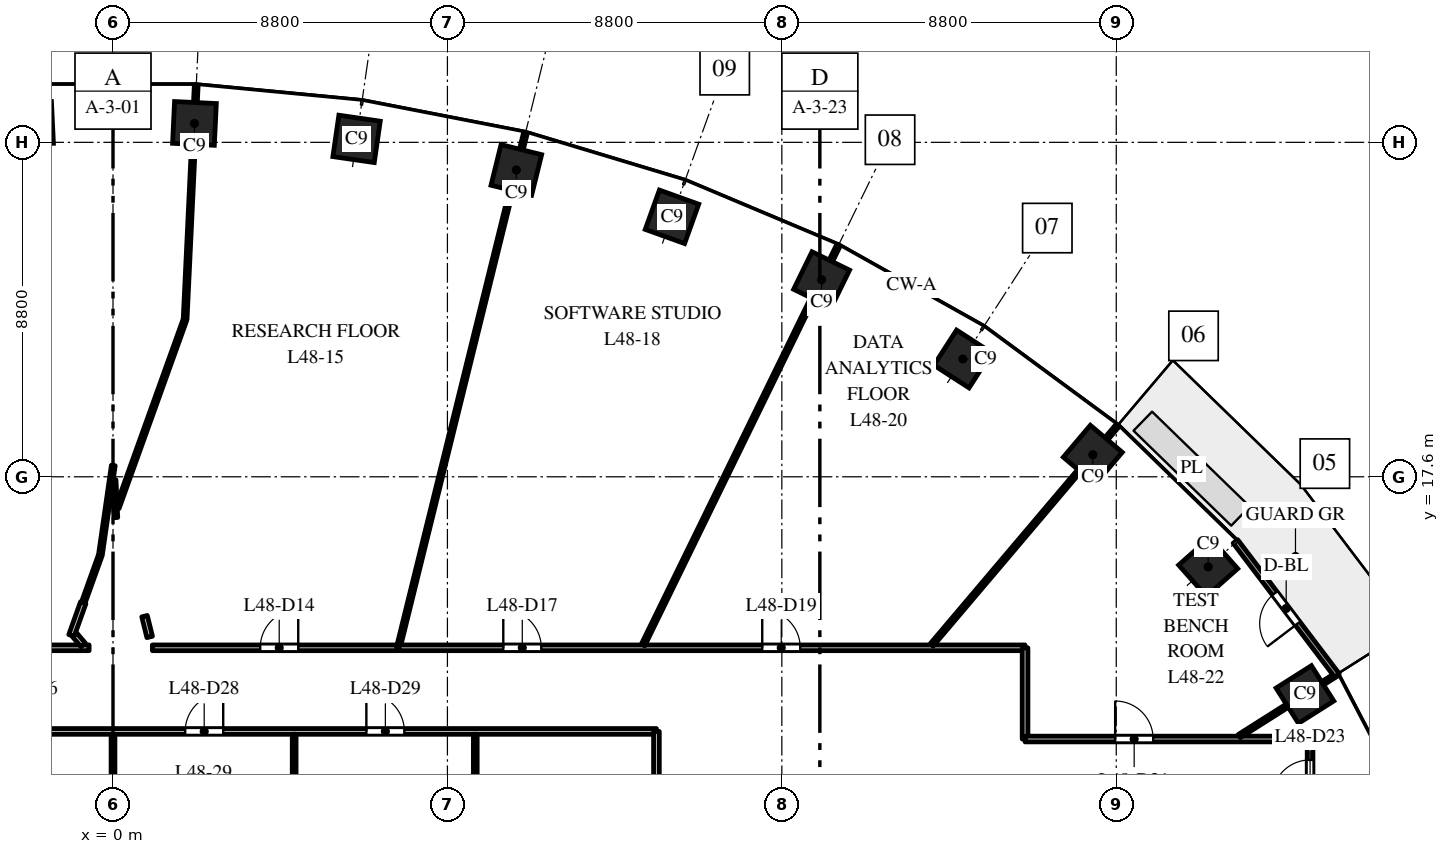
"""IFC4 building model, lengths in metres.
Left out: names, types, materials, properties, quantities, classifications, styles, units other than length and angle.
Written with IfcOpenShell. Run it as: python <this file> out.ifc"""

import sys

from ifc_helpers import new_model, si_unit, direction, frame, frame_2d, origin, origin_2d, place, context, subcontext, project, spatial, rectangle, extrude, element, fill, save


model = new_model("IFC4")
c1 = context("Model", 3, precision=1e-05, world=origin(), true_north=direction((0.0, 1.0)))
c2 = subcontext(c1, "Body", "Model", "MODEL_VIEW")
j1 = project(units=[si_unit("LENGTHUNIT", "METRE"), si_unit("PLANEANGLEUNIT", "RADIAN")], contexts=[c1])
p1 = place(None, origin())
s1 = spatial("IfcSite", under=j1, at=p1, CompositionType="ELEMENT")
p2 = place(p1, origin())
s2 = spatial("IfcBuilding", under=s1, at=p2, CompositionType="ELEMENT")
p3 = place(p2, frame((0.0, 0.0, 233.5)))
s3 = spatial("IfcBuildingStorey", under=s2, at=p3, CompositionType="ELEMENT", Elevation=233.5)
for number, where, z_axis, x_axis in (
    (1, (31.365, 11.871, 0.0), (0.0, 0.0, 1.0), (-0.535, 0.845, 0.0)),
    (2, (28.819, 15.23, 0.0), (0.0, 0.0, 1.0), (-0.663, 0.749, 0.0)),
    (3, (25.783, 18.18, 0.0), (0.0, 0.0, 1.0), (-0.763, 0.646, 0.0)),
    (4, (22.362, 20.7, 0.0), (0.0, 0.0, 1.0), (-0.84, 0.542, 0.0)),
    (5, (18.646, 22.785, 0.0), (0.0, 0.0, 1.0), (-0.898, 0.439, 0.0)),
    (6, (14.709, 24.441, 0.0), (0.0, 0.0, 1.0), (-0.941, 0.338, 0.0)),
    (7, (10.613, 25.674, 0.0), (0.0, 0.0, 1.0), (-0.971, 0.24, 0.0)),
    (8, (6.409, 26.491, 0.0), (0.0, 0.0, 1.0), (-0.99, 0.143, 0.0)),
    (9, (2.143, 26.898, 0.0), (0.0, 0.0, 1.0), (-0.999, 0.048, 0.0)),
    (10, (-2.143, 26.898, 0.0), (0.0, 0.0, 1.0), (-0.999, -0.048, 0.0)),
):
    element("IfcColumn", number, at=place(p3, frame(where, z_axis=z_axis, x_axis=x_axis)), inside=s3, PredefinedType="COLUMN", context=c2, shape_type="SweptSolid", body=[
        extrude(rectangle(XDim=1.1, YDim=1.1, at=origin_2d()), origin(), (0.0, 0.0, 1.0), 4.0),
    ])
p4 = place(p3, frame((32.208, 12.374, 0.0), z_axis=(0.0, 0.0, 1.0), x_axis=(-0.604045763106, 0.796949632081, 0.0)))
e11 = element("IfcWall", 11, at=p4, inside=s3, PredefinedType="STANDARD", context=c2, shape_type="SweptSolid", body=[
    extrude(rectangle(XDim=4.423, YDim=0.15, at=frame_2d((2.212, 0.0))), origin(), (0.0, 0.0, 1.0), 3.7),
])
p5 = place(p4, frame((1.712, 0.0, 0.0)))
e12 = element("IfcOpeningElement", 12, at=p5, cuts=e11, PredefinedType="OPENING", context=c2, shape_type="SweptSolid", body=[
    extrude(rectangle(XDim=1.0, YDim=2.4, at=frame_2d((0.5, 1.2))), frame((0.0, 0.085, 0.0), z_axis=(0.0, -1.0, 0.0), x_axis=(1.0, 0.0, 0.0)), (0.0, 0.0, 1.0), 0.17),
])
p6 = place(p3, frame((-14.3, 10.9, 0.0), z_axis=(0.0, 0.0, 1.0), x_axis=(1.0, 0.0, 0.0)))
e13 = element("IfcWall", 13, at=p6, inside=s3, PredefinedType="PARTITIONING", context=c2, shape_type="SweptSolid", body=[
    extrude(rectangle(XDim=28.6, YDim=0.15, at=frame_2d((14.3, 0.0))), origin(), (0.0, 0.0, 1.0), 2.85),
])
p7 = place(p6, frame((11.433, 0.0, 0.0)))
e14 = element("IfcOpeningElement", 14, at=p7, cuts=e13, PredefinedType="OPENING", context=c2, shape_type="SweptSolid", body=[
    extrude(rectangle(XDim=1.0, YDim=2.1, at=frame_2d((0.5, 1.05))), frame((0.0, 0.085, 0.0), z_axis=(0.0, -1.0, 0.0), x_axis=(1.0, 0.0, 0.0)), (0.0, 0.0, 1.0), 0.17),
])
p8 = place(p6, frame((16.2, 0.0, 0.0)))
e15 = element("IfcOpeningElement", 15, at=p8, cuts=e13, PredefinedType="OPENING", context=c2, shape_type="SweptSolid", body=[
    extrude(rectangle(XDim=1.0, YDim=2.1, at=frame_2d((0.5, 1.05))), frame((0.0, 0.085, 0.0), z_axis=(0.0, -1.0, 0.0), x_axis=(1.0, 0.0, 0.0)), (0.0, 0.0, 1.0), 0.17),
])
p9 = place(p6, frame((20.967, 0.0, 0.0)))
e16 = element("IfcOpeningElement", 16, at=p9, cuts=e13, PredefinedType="OPENING", context=c2, shape_type="SweptSolid", body=[
    extrude(rectangle(XDim=1.0, YDim=2.1, at=frame_2d((0.5, 1.05))), frame((0.0, 0.085, 0.0), z_axis=(0.0, -1.0, 0.0), x_axis=(1.0, 0.0, 0.0)), (0.0, 0.0, 1.0), 0.17),
])
p10 = place(p3, frame((-7.925, 13.1, 0.0), z_axis=(0.0, 0.0, 1.0), x_axis=(1.0, 0.0, 0.0)))
e17 = element("IfcWall", 17, at=p10, inside=s3, PredefinedType="PARTITIONING", context=c2, shape_type="SweptSolid", body=[
    extrude(rectangle(XDim=7.296, YDim=0.15, at=frame_2d((3.648, 0.0))), origin(), (0.0, 0.0, 1.0), 2.85),
])
p11 = place(p10, frame((3.048, 0.0, 0.0)))
e18 = element("IfcOpeningElement", 18, at=p11, cuts=e17, PredefinedType="OPENING", context=c2, shape_type="SweptSolid", body=[
    extrude(rectangle(XDim=1.0, YDim=2.1, at=frame_2d((0.5, 1.05))), frame((0.0, 0.085, 0.0), z_axis=(0.0, -1.0, 0.0), x_axis=(1.0, 0.0, 0.0)), (0.0, 0.0, 1.0), 0.17),
])
p12 = place(p3, frame((-1.093, 13.423, 0.0), z_axis=(0.0, 0.0, 1.0), x_axis=(0.337586124745, 0.941294644827, 0.0)))
e19 = element("IfcWall", 19, at=p12, inside=s3, PredefinedType="PARTITIONING", context=c2, shape_type="SweptSolid", body=[
    extrude(rectangle(XDim=0.916, YDim=0.15, at=frame_2d((0.458, 0.0))), origin(), (0.0, 0.0, 1.0), 2.85),
])
p13 = place(p3, frame((-1.008, 13.439, 0.0), z_axis=(0.0, 0.0, 1.0), x_axis=(0.645657197235, -0.763627385351, 0.0)))
e20 = element("IfcWall", 20, at=p13, inside=s3, PredefinedType="PARTITIONING", context=c2, shape_type="SweptSolid", body=[
    extrude(rectangle(XDim=0.346, YDim=0.15, at=frame_2d((0.173, 0.0))), origin(), (0.0, 0.0, 1.0), 2.85),
])
p14 = place(p3, frame((-0.781, 14.294, 0.0), z_axis=(0.0, 0.0, 1.0), x_axis=(0.338162451205, 0.941087751804, 0.0)))
e21 = element("IfcWall", 21, at=p14, inside=s3, PredefinedType="PARTITIONING", context=c2, shape_type="SweptSolid", body=[
    extrude(rectangle(XDim=1.304, YDim=0.1, at=frame_2d((0.652, 0.0))), origin(), (0.0, 0.0, 1.0), 3.7),
])
p15 = place(p3, frame((-0.332, 15.539, 0.0), z_axis=(0.0, 0.0, 1.0), x_axis=(0.142697629543, 0.989766329253, 0.0)))
e22 = element("IfcWall", 22, at=p15, inside=s3, PredefinedType="PARTITIONING", context=c2, shape_type="SweptSolid", body=[
    extrude(rectangle(XDim=2.383, YDim=0.1, at=frame_2d((1.192, 0.0))), origin(), (0.0, 0.0, 1.0), 3.7),
])
p16 = place(p3, frame((0.0, 7.504, 0.0), z_axis=(0.0, 0.0, 1.0), x_axis=(0.0, 1.0, 0.0)))
e23 = element("IfcWall", 23, at=p16, inside=s3, PredefinedType="PARTITIONING", context=c2, shape_type="SweptSolid", body=[
    extrude(rectangle(XDim=3.321, YDim=0.1, at=frame_2d((1.661, 0.0))), origin(), (0.0, 0.0, 1.0), 3.7),
])
p17 = place(p3, frame((0.028, 17.518, 0.0), z_axis=(0.0, 0.0, 1.0), x_axis=(0.046267226044, -0.998929098482, 0.0)))
e24 = element("IfcWall", 24, at=p17, inside=s3, PredefinedType="PARTITIONING", context=c2, shape_type="SweptSolid", body=[
    extrude(rectangle(XDim=0.992, YDim=0.1, at=frame_2d((0.496, 0.0))), origin(), (0.0, 0.0, 1.0), 3.7),
])
p18 = place(p3, frame((0.113, 16.781, 0.0), z_axis=(0.0, 0.0, 1.0), x_axis=(0.338409154086, 0.940999067178, 0.0)))
e25 = element("IfcWall", 25, at=p18, inside=s3, PredefinedType="PARTITIONING", context=c2, shape_type="SweptSolid", body=[
    extrude(rectangle(XDim=5.266, YDim=0.1, at=frame_2d((2.633, 0.0))), origin(), (0.0, 0.0, 1.0), 3.7),
])
p19 = place(p3, frame((0.83, 13.933, 0.0), z_axis=(0.0, 0.0, 1.0), x_axis=(0.239578315167, -0.970877042113, 0.0)))
e26 = element("IfcWall", 26, at=p19, inside=s3, PredefinedType="PARTITIONING", context=c2, shape_type="SweptSolid", body=[
    extrude(rectangle(XDim=0.563, YDim=0.15, at=frame_2d((0.282, 0.0))), origin(), (0.0, 0.0, 1.0), 3.7),
])
p20 = place(p3, frame((1.036, 13.1, 0.0), z_axis=(0.0, 0.0, 1.0), x_axis=(1.0, 0.0, 0.0)))
e27 = element("IfcWall", 27, at=p20, inside=s3, PredefinedType="PARTITIONING", context=c2, shape_type="SweptSolid", body=[
    extrude(rectangle(XDim=6.471, YDim=0.15, at=frame_2d((3.236, 0.0))), origin(), (0.0, 0.0, 1.0), 2.85),
])
p21 = place(p20, frame((2.838, 0.0, 0.0)))
e28 = element("IfcOpeningElement", 28, at=p21, cuts=e27, PredefinedType="OPENING", context=c2, shape_type="SweptSolid", body=[
    extrude(rectangle(XDim=1.0, YDim=2.1, at=frame_2d((0.5, 1.05))), frame((0.0, 0.085, 0.0), z_axis=(0.0, -1.0, 0.0), x_axis=(1.0, 0.0, 0.0)), (0.0, 0.0, 1.0), 0.17),
])
p22 = place(p3, frame((1.898, 21.75, 0.0), z_axis=(0.0, 0.0, 1.0), x_axis=(0.047440765919, 0.998874052986, 0.0)))
e29 = element("IfcWall", 29, at=p22, inside=s3, PredefinedType="PARTITIONING", context=c2, shape_type="SweptSolid", body=[
    extrude(rectangle(XDim=6.155, YDim=0.1, at=frame_2d((3.077, 0.0))), origin(), (0.0, 0.0, 1.0), 3.0),
])
p23 = place(p3, frame((4.767, 6.363, 0.0), z_axis=(0.0, 0.0, 1.0), x_axis=(0.0, 1.0, 0.0)))
e30 = element("IfcWall", 30, at=p23, inside=s3, PredefinedType="PARTITIONING", context=c2, shape_type="SweptSolid", body=[
    extrude(rectangle(XDim=4.462, YDim=0.1, at=frame_2d((2.231, 0.0))), origin(), (0.0, 0.0, 1.0), 2.85),
])
p24 = place(p3, frame((7.507, 13.1, 0.0), z_axis=(0.0, 0.0, 1.0), x_axis=(0.239800961037, 0.970822073856, 0.0)))
e31 = element("IfcWall", 31, at=p24, inside=s3, PredefinedType="PARTITIONING", context=c2, shape_type="SweptSolid", body=[
    extrude(rectangle(XDim=13.953, YDim=0.1, at=frame_2d((6.977, 0.0))), origin(), (0.0, 0.0, 1.0), 3.0),
])
p25 = place(p3, frame((7.524, 13.1, 0.0), z_axis=(0.0, 0.0, 1.0), x_axis=(1.0, 0.0, 0.0)))
e32 = element("IfcWall", 32, at=p25, inside=s3, PredefinedType="PARTITIONING", context=c2, shape_type="SweptSolid", body=[
    extrude(rectangle(XDim=16.476, YDim=0.15, at=frame_2d((8.238, 0.0))), origin(), (0.0, 0.0, 1.0), 2.85),
])
p26 = place(p25, frame((2.746, 0.0, 0.0)))
e33 = element("IfcOpeningElement", 33, at=p26, cuts=e32, PredefinedType="OPENING", context=c2, shape_type="SweptSolid", body=[
    extrude(rectangle(XDim=1.0, YDim=2.1, at=frame_2d((0.5, 1.05))), frame((0.0, 0.085, 0.0), z_axis=(0.0, -1.0, 0.0), x_axis=(1.0, 0.0, 0.0)), (0.0, 0.0, 1.0), 0.17),
])
p27 = place(p25, frame((9.56, 0.0, 0.0)))
e34 = element("IfcOpeningElement", 34, at=p27, cuts=e32, PredefinedType="OPENING", context=c2, shape_type="SweptSolid", body=[
    extrude(rectangle(XDim=1.0, YDim=2.1, at=frame_2d((0.5, 1.05))), frame((0.0, 0.085, 0.0), z_axis=(0.0, -1.0, 0.0), x_axis=(1.0, 0.0, 0.0)), (0.0, 0.0, 1.0), 0.17),
])
p28 = place(p3, frame((9.533, -10.825, 0.0), z_axis=(0.0, 0.0, 1.0), x_axis=(0.0, 1.0, 0.0)))
e35 = element("IfcWall", 35, at=p28, inside=s3, PredefinedType="PARTITIONING", context=c2, shape_type="SweptSolid", body=[
    extrude(rectangle(XDim=21.65, YDim=0.1, at=frame_2d((10.825, 0.0))), origin(), (0.0, 0.0, 1.0), 2.75),
])
p29 = place(p3, frame((13.948, 13.175, 0.0), z_axis=(0.0, 0.0, 1.0), x_axis=(0.439190294188, 0.898394059136, 0.0)))
e36 = element("IfcWall", 36, at=p29, inside=s3, PredefinedType="PARTITIONING", context=c2, shape_type="SweptSolid", body=[
    extrude(rectangle(XDim=11.699, YDim=0.1, at=frame_2d((5.849, 0.0))), origin(), (0.0, 0.0, 1.0), 3.0),
])
p30 = place(p3, frame((14.3, -10.9, 0.0), z_axis=(0.0, 0.0, 1.0), x_axis=(0.0, 1.0, 0.0)))
e37 = element("IfcWall", 37, at=p30, inside=s3, PredefinedType="PARTITIONING", context=c2, shape_type="SweptSolid", body=[
    extrude(rectangle(XDim=21.8, YDim=0.15, at=frame_2d((10.9, 0.0))), origin(), (0.0, 0.0, 1.0), 2.75),
])
p31 = place(p30, frame((10.4, 0.0, 0.0)))
e38 = element("IfcOpeningElement", 38, at=p31, cuts=e37, PredefinedType="OPENING", context=c2, shape_type="SweptSolid", body=[
    extrude(rectangle(XDim=1.0, YDim=2.1, at=frame_2d((0.5, 1.05))), frame((0.0, 0.085, 0.0), z_axis=(0.0, -1.0, 0.0), x_axis=(1.0, 0.0, 0.0)), (0.0, 0.0, 1.0), 0.17),
])
p32 = place(p3, frame((21.542, 13.175, 0.0), z_axis=(0.0, 0.0, 1.0), x_axis=(0.646374865928, 0.763020008058, 0.0)))
e39 = element("IfcWall", 39, at=p32, inside=s3, PredefinedType="PARTITIONING", context=c2, shape_type="SweptSolid", body=[
    extrude(rectangle(XDim=7.562, YDim=0.1, at=frame_2d((3.781, 0.0))), origin(), (0.0, 0.0, 1.0), 3.0),
])
p33 = place(p3, frame((24.0, 10.7, 0.0), z_axis=(0.0, 0.0, 1.0), x_axis=(0.0, 1.0, 0.0)))
e40 = element("IfcWall", 40, at=p33, inside=s3, PredefinedType="PARTITIONING", context=c2, shape_type="SweptSolid", body=[
    extrude(rectangle(XDim=2.4, YDim=0.15, at=frame_2d((1.2, 0.0))), origin(), (0.0, 0.0, 1.0), 2.75),
])
p34 = place(p3, frame((24.0, 10.7, 0.0), z_axis=(0.0, 0.0, 1.0), x_axis=(1.0, 0.0, 0.0)))
e41 = element("IfcWall", 41, at=p34, inside=s3, PredefinedType="PARTITIONING", context=c2, shape_type="SweptSolid", body=[
    extrude(rectangle(XDim=7.5, YDim=0.15, at=frame_2d((3.75, 0.0))), origin(), (0.0, 0.0, 1.0), 3.0),
])
p35 = place(p34, frame((2.371, 0.0, 0.0)))
e42 = element("IfcOpeningElement", 42, at=p35, cuts=e41, PredefinedType="OPENING", context=c2, shape_type="SweptSolid", body=[
    extrude(rectangle(XDim=1.0, YDim=2.1, at=frame_2d((0.5, 1.05))), frame((0.0, 0.085, 0.0), z_axis=(0.0, -1.0, 0.0), x_axis=(1.0, 0.0, 0.0)), (0.0, 0.0, 1.0), 0.17),
])
p36 = place(p3, frame((29.637, 10.777, 0.0), z_axis=(0.0, 0.0, 1.0), x_axis=(0.844810627195, 0.535065420467, 0.0)))
e43 = element("IfcWall", 43, at=p36, inside=s3, PredefinedType="PARTITIONING", context=c2, shape_type="SweptSolid", body=[
    extrude(rectangle(XDim=3.048, YDim=0.1, at=frame_2d((1.524, 0.0))), origin(), (0.0, 0.0, 1.0), 3.0),
])
p37 = place(p3, frame((31.5, 8.5, 0.0), z_axis=(0.0, 0.0, 1.0), x_axis=(0.0, 1.0, 0.0)))
e44 = element("IfcWall", 44, at=p37, inside=s3, PredefinedType="PARTITIONING", context=c2, shape_type="SweptSolid", body=[
    extrude(rectangle(XDim=2.2, YDim=0.15, at=frame_2d((1.1, 0.0))), origin(), (0.0, 0.0, 1.0), 3.0),
])
p38 = place(p37, frame((0.65, 0.0, 0.0)))
e45 = element("IfcOpeningElement", 45, at=p38, cuts=e44, PredefinedType="OPENING", context=c2, shape_type="SweptSolid", body=[
    extrude(rectangle(XDim=1.0, YDim=2.1, at=frame_2d((0.5, 1.05))), frame((0.0, 0.085, 0.0), z_axis=(0.0, -1.0, 0.0), x_axis=(1.0, 0.0, 0.0)), (0.0, 0.0, 1.0), 0.17),
])
p39 = place(p5, origin())
e46 = element("IfcDoor", 46, at=p39, inside=s3, OperationType="SINGLE_SWING_LEFT", PredefinedType="DOOR", context=c2, shape_type="SweptSolid", body=[
    extrude(rectangle(XDim=1.0, YDim=2.4, at=frame_2d((0.5, 1.2))), frame((0.0, 0.025, 0.0), z_axis=(0.0, -1.0, 0.0), x_axis=(1.0, 0.0, 0.0)), (0.0, 0.0, 1.0), 0.05),
])
fill(e12, e46)
p40 = place(p21, origin())
e47 = element("IfcDoor", 47, at=p40, inside=s3, OperationType="SINGLE_SWING_RIGHT", PredefinedType="DOOR", context=c2, shape_type="SweptSolid", body=[
    extrude(rectangle(XDim=1.0, YDim=2.1, at=frame_2d((0.5, 1.05))), frame((0.0, 0.025, 0.0), z_axis=(0.0, -1.0, 0.0), x_axis=(1.0, 0.0, 0.0)), (0.0, 0.0, 1.0), 0.05),
])
fill(e28, e47)
p41 = place(p26, origin())
e48 = element("IfcDoor", 48, at=p41, inside=s3, OperationType="SINGLE_SWING_LEFT", PredefinedType="DOOR", context=c2, shape_type="SweptSolid", body=[
    extrude(rectangle(XDim=1.0, YDim=2.1, at=frame_2d((0.5, 1.05))), frame((0.0, 0.025, 0.0), z_axis=(0.0, -1.0, 0.0), x_axis=(1.0, 0.0, 0.0)), (0.0, 0.0, 1.0), 0.05),
])
fill(e33, e48)
p42 = place(p27, origin())
e49 = element("IfcDoor", 49, at=p42, inside=s3, OperationType="SINGLE_SWING_LEFT", PredefinedType="DOOR", context=c2, shape_type="SweptSolid", body=[
    extrude(rectangle(XDim=1.0, YDim=2.1, at=frame_2d((0.5, 1.05))), frame((0.0, 0.025, 0.0), z_axis=(0.0, -1.0, 0.0), x_axis=(1.0, 0.0, 0.0)), (0.0, 0.0, 1.0), 0.05),
])
fill(e34, e49)
p43 = place(p35, origin())
e50 = element("IfcDoor", 50, at=p43, inside=s3, OperationType="SINGLE_SWING_LEFT", PredefinedType="DOOR", context=c2, shape_type="SweptSolid", body=[
    extrude(rectangle(XDim=1.0, YDim=2.1, at=frame_2d((0.5, 1.05))), frame((0.0, 0.025, 0.0), z_axis=(0.0, -1.0, 0.0), x_axis=(1.0, 0.0, 0.0)), (0.0, 0.0, 1.0), 0.05),
])
fill(e42, e50)
p44 = place(p38, origin())
e51 = element("IfcDoor", 51, at=p44, inside=s3, OperationType="SINGLE_SWING_LEFT", PredefinedType="DOOR", context=c2, shape_type="SweptSolid", body=[
    extrude(rectangle(XDim=1.0, YDim=2.1, at=frame_2d((0.5, 1.05))), frame((0.0, 0.025, 0.0), z_axis=(0.0, -1.0, 0.0), x_axis=(1.0, 0.0, 0.0)), (0.0, 0.0, 1.0), 0.05),
])
fill(e45, e51)
p45 = place(p8, origin())
e52 = element("IfcDoor", 52, at=p45, inside=s3, OperationType="SINGLE_SWING_RIGHT", PredefinedType="DOOR", context=c2, shape_type="SweptSolid", body=[
    extrude(rectangle(XDim=1.0, YDim=2.1, at=frame_2d((0.5, 1.05))), frame((0.0, 0.025, 0.0), z_axis=(0.0, -1.0, 0.0), x_axis=(1.0, 0.0, 0.0)), (0.0, 0.0, 1.0), 0.05),
])
fill(e15, e52)
p46 = place(p9, origin())
e53 = element("IfcDoor", 53, at=p46, inside=s3, OperationType="SINGLE_SWING_LEFT", PredefinedType="DOOR", context=c2, shape_type="SweptSolid", body=[
    extrude(rectangle(XDim=1.0, YDim=2.1, at=frame_2d((0.5, 1.05))), frame((0.0, 0.025, 0.0), z_axis=(0.0, -1.0, 0.0), x_axis=(1.0, 0.0, 0.0)), (0.0, 0.0, 1.0), 0.05),
])
fill(e16, e53)
save(model, sys.argv[1])
